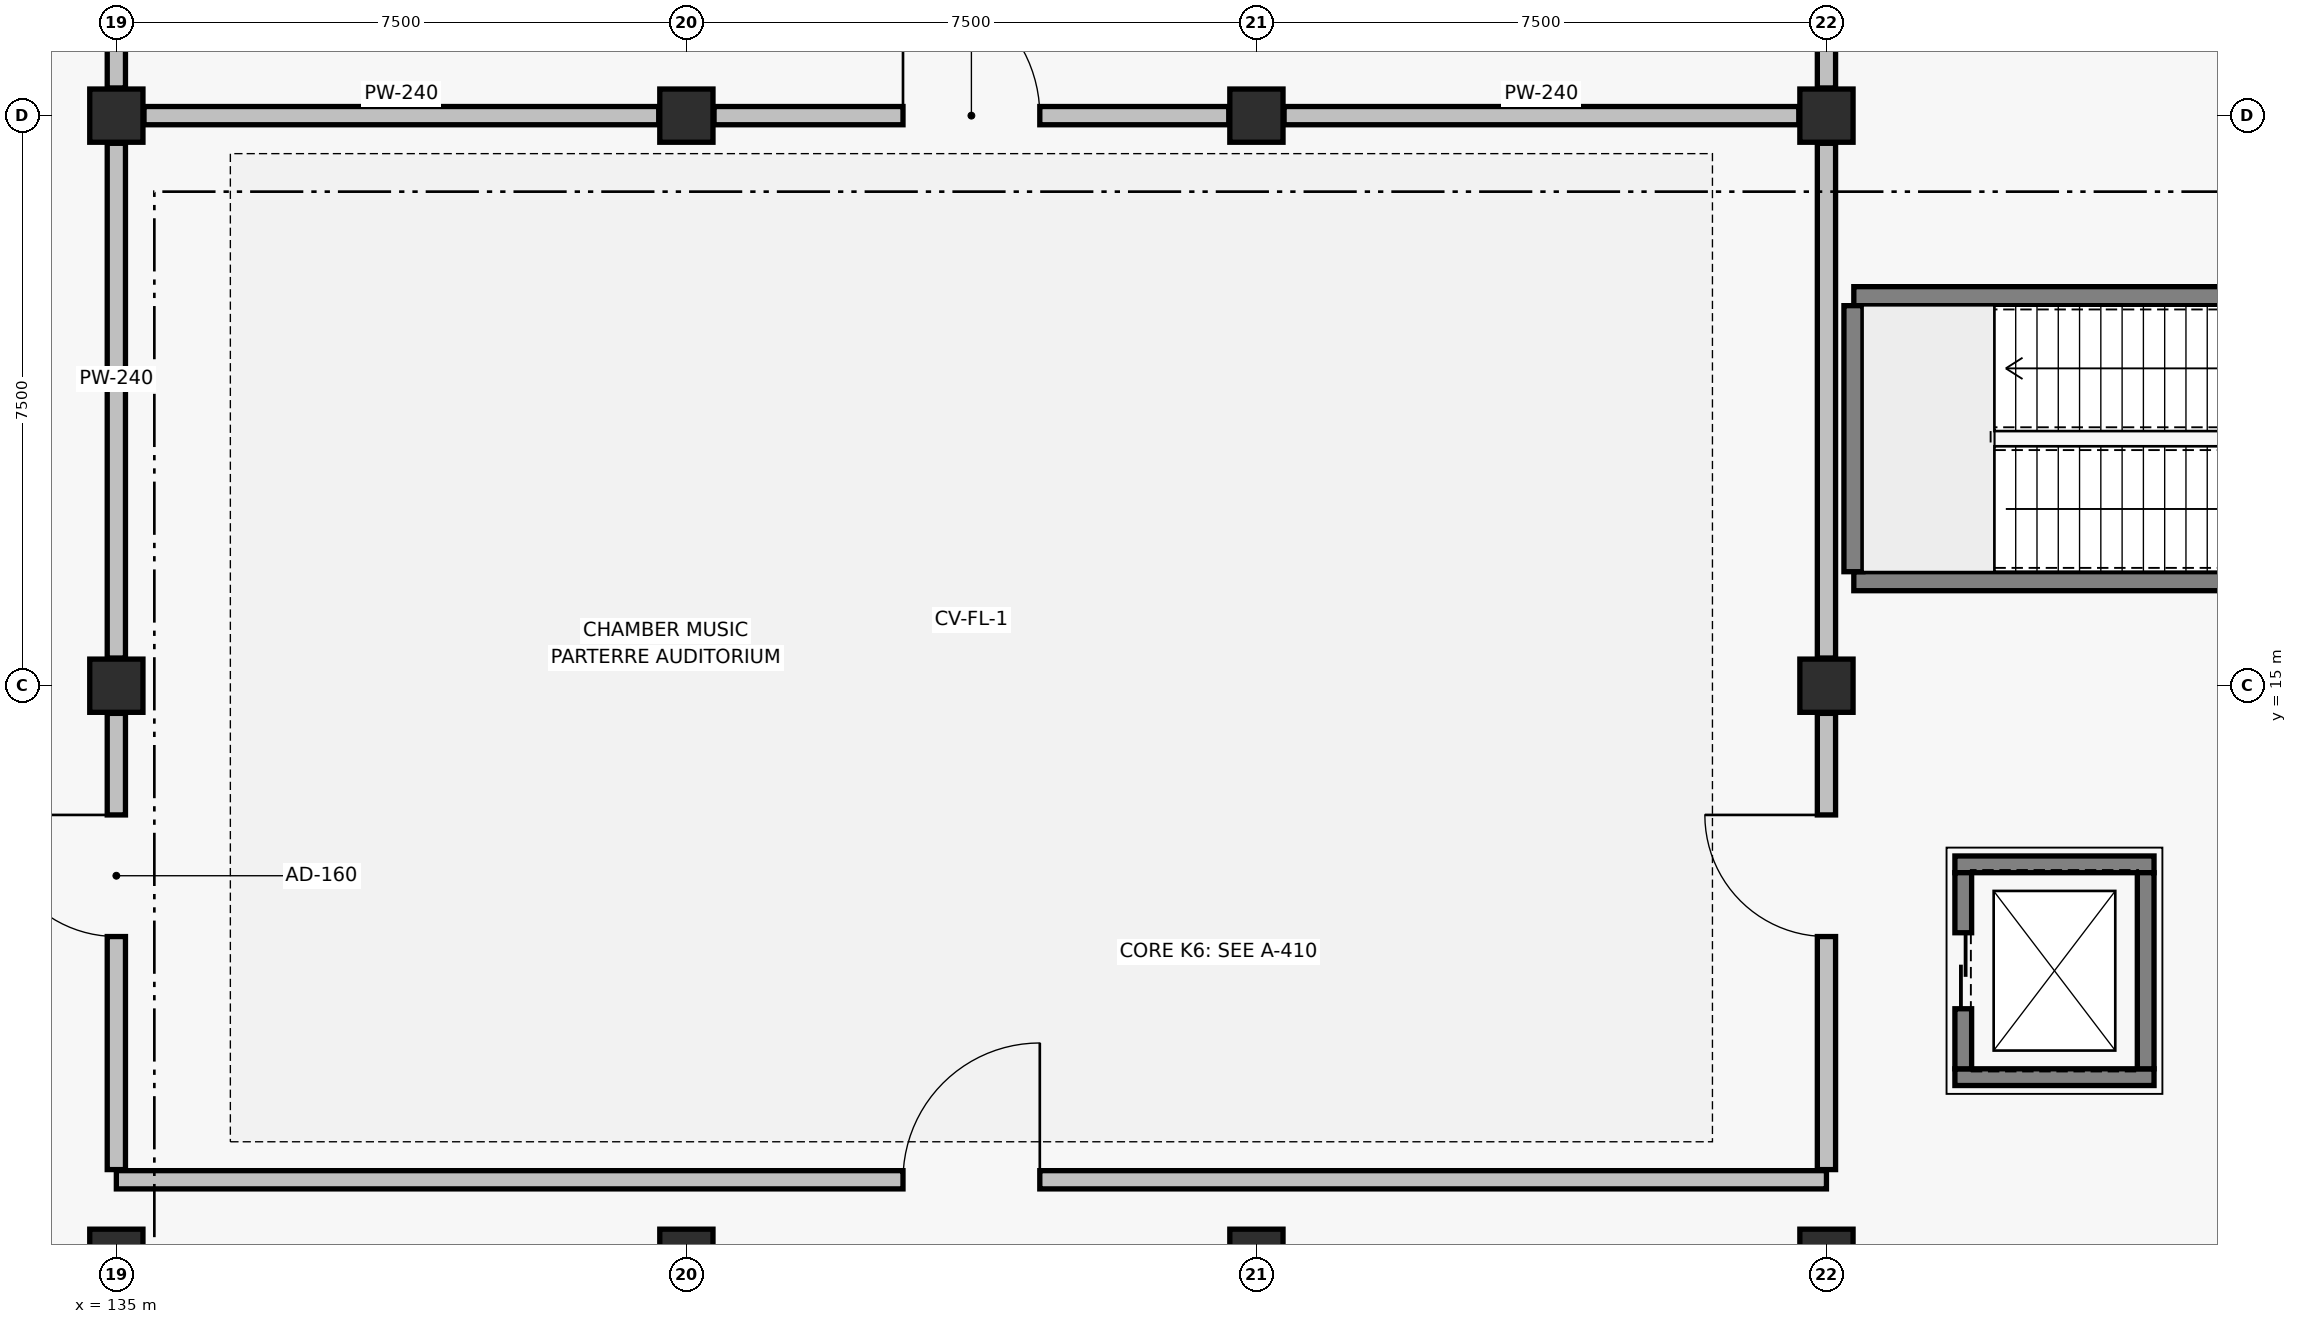
"""IFC4 building model, lengths in metres.
Left out: names, types, materials, properties, quantities, classifications, styles, units other than length and angle.
Written with IfcOpenShell. Run it as: python <this file> out.ifc"""

import sys

from ifc_helpers import new_model, si_unit, direction, frame, frame_2d, origin, origin_2d, place, context, subcontext, project, spatial, rectangle, extrude, element, fill, save


model = new_model("IFC4")
c1 = context("Model", 3, precision=1e-05, world=origin(), true_north=direction((0.0, 1.0)))
c2 = subcontext(c1, "Body", "Model", "MODEL_VIEW")
j1 = project(units=[si_unit("LENGTHUNIT", "METRE"), si_unit("PLANEANGLEUNIT", "RADIAN")], contexts=[c1])
p1 = place(None, origin())
s1 = spatial("IfcSite", under=j1, at=p1, CompositionType="ELEMENT")
p2 = place(p1, origin())
s2 = spatial("IfcBuilding", under=s1, at=p2, CompositionType="ELEMENT")
p3 = place(p2, origin())
s3 = spatial("IfcBuildingStorey", under=s2, at=p3, CompositionType="ELEMENT", Elevation=0.0)
for number, where, z_axis, x_axis in (
    (1, (135.0, 7.5, 0.0), (0.0, 0.0, 1.0), (1.0, 0.0, 0.0)),
    (2, (135.0, 15.0, 0.0), (0.0, 0.0, 1.0), (1.0, 0.0, 0.0)),
    (3, (135.0, 22.5, 0.0), (0.0, 0.0, 1.0), (1.0, 0.0, 0.0)),
    (4, (142.5, 7.5, 0.0), (0.0, 0.0, 1.0), (1.0, 0.0, 0.0)),
    (5, (142.5, 22.5, 0.0), (0.0, 0.0, 1.0), (1.0, 0.0, 0.0)),
    (6, (150.0, 7.5, 0.0), (0.0, 0.0, 1.0), (1.0, 0.0, 0.0)),
    (7, (150.0, 22.5, 0.0), (0.0, 0.0, 1.0), (1.0, 0.0, 0.0)),
    (8, (157.5, 7.5, 0.0), (0.0, 0.0, 1.0), (1.0, 0.0, 0.0)),
    (9, (157.5, 15.0, 0.0), (0.0, 0.0, 1.0), (1.0, 0.0, 0.0)),
    (10, (157.5, 22.5, 0.0), (0.0, 0.0, 1.0), (1.0, 0.0, 0.0)),
):
    element("IfcColumn", number, at=place(p3, frame(where, z_axis=z_axis, x_axis=x_axis)), inside=s3, PredefinedType="COLUMN", context=c2, shape_type="SweptSolid", body=[
        extrude(rectangle(XDim=0.7, YDim=0.7, at=origin_2d()), origin(), (0.0, 0.0, 1.0), 4.8),
    ])
p4 = place(p3, frame((157.86, 16.375, 0.0), z_axis=(0.0, 0.0, 1.0), x_axis=(1.0, 0.0, 0.0)))
e11 = element("IfcWall", 11, at=p4, inside=s3, PredefinedType="SOLIDWALL", context=c2, shape_type="SweptSolid", body=[
    extrude(rectangle(XDim=7.26, YDim=0.25, at=frame_2d((3.63, 0.0))), origin(), (0.0, 0.0, 1.0), 4.5),
])
p5 = place(p4, frame((5.71, 0.0, 0.0)))
e12 = element("IfcOpeningElement", 12, at=p5, cuts=e11, PredefinedType="OPENING", context=c2, shape_type="SweptSolid", body=[
    extrude(rectangle(XDim=1.1, YDim=2.15, at=frame_2d((0.55, 1.075))), frame((0.0, 0.135, 0.0), z_axis=(0.0, -1.0, 0.0), x_axis=(1.0, 0.0, 0.0)), (0.0, 0.0, 1.0), 0.27),
])
p6 = place(p3, frame((157.86, 20.125, 0.0), z_axis=(0.0, 0.0, 1.0), x_axis=(1.0, 0.0, 0.0)))
e13 = element("IfcWall", 13, at=p6, inside=s3, PredefinedType="SOLIDWALL", context=c2, shape_type="SweptSolid", body=[
    extrude(rectangle(XDim=7.26, YDim=0.25, at=frame_2d((3.63, 0.0))), origin(), (0.0, 0.0, 1.0), 4.5),
])
p7 = place(p3, frame((157.855, 16.5, 0.0), z_axis=(0.0, 0.0, 1.0), x_axis=(0.0, 1.0, 0.0)))
e14 = element("IfcWall", 14, at=p7, inside=s3, PredefinedType="SOLIDWALL", context=c2, shape_type="SweptSolid", body=[
    extrude(rectangle(XDim=3.5, YDim=0.25, at=frame_2d((1.75, 0.0))), origin(), (0.0, 0.0, 1.0), 4.5),
])
for number, where, z_axis, x_axis in (
    (15, (159.19, 9.85, 0.0), (0.0, 0.0, 1.0), (1.0, 0.0, 0.0)),
    (16, (159.19, 12.65, 0.0), (0.0, 0.0, 1.0), (1.0, 0.0, 0.0)),
):
    element("IfcWall", number, at=place(p3, frame(where, z_axis=z_axis, x_axis=x_axis)), inside=s3, PredefinedType="SOLIDWALL", context=c2, shape_type="SweptSolid", body=[
        extrude(rectangle(XDim=2.62, YDim=0.22, at=frame_2d((1.31, 0.0))), origin(), (0.0, 0.0, 1.0), 4.5),
    ])
p8 = place(p3, frame((159.3, 9.96, 0.0), z_axis=(0.0, 0.0, 1.0), x_axis=(0.0, 1.0, 0.0)))
e17 = element("IfcWall", 17, at=p8, inside=s3, PredefinedType="SOLIDWALL", context=c2, shape_type="SweptSolid", body=[
    extrude(rectangle(XDim=2.58, YDim=0.22, at=frame_2d((1.29, 0.0))), origin(), (0.0, 0.0, 1.0), 4.5),
])
p9 = place(p8, frame((0.79, 0.0, 0.0)))
e18 = element("IfcOpeningElement", 18, at=p9, cuts=e17, PredefinedType="OPENING", context=c2, shape_type="SweptSolid", body=[
    extrude(rectangle(XDim=1.0, YDim=2.15, at=frame_2d((0.5, 1.075))), frame((0.0, 0.12, 0.0), z_axis=(0.0, -1.0, 0.0), x_axis=(1.0, 0.0, 0.0)), (0.0, 0.0, 1.0), 0.24),
])
p10 = place(p3, frame((161.7, 9.96, 0.0), z_axis=(0.0, 0.0, 1.0), x_axis=(0.0, 1.0, 0.0)))
e19 = element("IfcWall", 19, at=p10, inside=s3, PredefinedType="SOLIDWALL", context=c2, shape_type="SweptSolid", body=[
    extrude(rectangle(XDim=2.58, YDim=0.22, at=frame_2d((1.29, 0.0))), origin(), (0.0, 0.0, 1.0), 4.5),
])
p11 = place(p3, frame((135.0, 8.5, 0.0), z_axis=(0.0, 0.0, 1.0), x_axis=(1.0, 0.0, 0.0)))
e20 = element("IfcWall", 20, at=p11, inside=s3, PredefinedType="PARTITIONING", context=c2, shape_type="SweptSolid", body=[
    extrude(rectangle(XDim=22.5, YDim=0.24, at=frame_2d((11.25, 0.0))), origin(), (0.0, 0.0, 1.0), 2.97),
])
p12 = place(p11, frame((10.35, 0.0, 0.0)))
e21 = element("IfcOpeningElement", 21, at=p12, cuts=e20, PredefinedType="OPENING", context=c2, shape_type="SweptSolid", body=[
    extrude(rectangle(XDim=1.8, YDim=2.16, at=frame_2d((0.9, 1.08))), frame((0.0, 0.13, 0.0), z_axis=(0.0, -1.0, 0.0), x_axis=(1.0, 0.0, 0.0)), (0.0, 0.0, 1.0), 0.26),
])
p13 = place(p3, frame((135.364, 22.5, 0.0), z_axis=(0.0, 0.0, 1.0), x_axis=(1.0, 0.0, 0.0)))
e22 = element("IfcWall", 22, at=p13, inside=s3, PredefinedType="PARTITIONING", context=c2, shape_type="SweptSolid", body=[
    extrude(rectangle(XDim=6.772, YDim=0.24, at=frame_2d((3.386, 0.0))), origin(), (0.0, 0.0, 1.0), 2.97),
])
p14 = place(p3, frame((142.864, 22.5, 0.0), z_axis=(0.0, 0.0, 1.0), x_axis=(1.0, 0.0, 0.0)))
e23 = element("IfcWall", 23, at=p14, inside=s3, PredefinedType="PARTITIONING", context=c2, shape_type="SweptSolid", body=[
    extrude(rectangle(XDim=6.772, YDim=0.24, at=frame_2d((3.386, 0.0))), origin(), (0.0, 0.0, 1.0), 2.97),
])
p15 = place(p14, frame((2.486, 0.0, 0.0)))
e24 = element("IfcOpeningElement", 24, at=p15, cuts=e23, PredefinedType="OPENING", context=c2, shape_type="SweptSolid", body=[
    extrude(rectangle(XDim=1.8, YDim=2.16, at=frame_2d((0.9, 1.08))), frame((0.0, 0.13, 0.0), z_axis=(0.0, -1.0, 0.0), x_axis=(1.0, 0.0, 0.0)), (0.0, 0.0, 1.0), 0.26),
])
p16 = place(p3, frame((150.364, 22.5, 0.0), z_axis=(0.0, 0.0, 1.0), x_axis=(1.0, 0.0, 0.0)))
e25 = element("IfcWall", 25, at=p16, inside=s3, PredefinedType="PARTITIONING", context=c2, shape_type="SweptSolid", body=[
    extrude(rectangle(XDim=6.772, YDim=0.24, at=frame_2d((3.386, 0.0))), origin(), (0.0, 0.0, 1.0), 2.97),
])
p17 = place(p3, frame((135.0, 8.634, 0.0), z_axis=(0.0, 0.0, 1.0), x_axis=(0.0, 1.0, 0.0)))
e26 = element("IfcWall", 26, at=p17, inside=s3, PredefinedType="PARTITIONING", context=c2, shape_type="SweptSolid", body=[
    extrude(rectangle(XDim=6.002, YDim=0.24, at=frame_2d((3.001, 0.0))), origin(), (0.0, 0.0, 1.0), 3.52),
])
p18 = place(p17, frame((3.066, 0.0, 0.0)))
e27 = element("IfcOpeningElement", 27, at=p18, cuts=e26, PredefinedType="OPENING", context=c2, shape_type="SweptSolid", body=[
    extrude(rectangle(XDim=1.6, YDim=2.16, at=frame_2d((0.8, 1.08))), frame((0.0, 0.13, 0.0), z_axis=(0.0, -1.0, 0.0), x_axis=(1.0, 0.0, 0.0)), (0.0, 0.0, 1.0), 0.26),
])
p19 = place(p3, frame((135.0, 15.364, 0.0), z_axis=(0.0, 0.0, 1.0), x_axis=(0.0, 1.0, 0.0)))
e28 = element("IfcWall", 28, at=p19, inside=s3, PredefinedType="PARTITIONING", context=c2, shape_type="SweptSolid", body=[
    extrude(rectangle(XDim=6.772, YDim=0.24, at=frame_2d((3.386, 0.0))), origin(), (0.0, 0.0, 1.0), 3.42),
])
p20 = place(p3, frame((135.0, 22.864, 0.0), z_axis=(0.0, 0.0, 1.0), x_axis=(0.0, 1.0, 0.0)))
e29 = element("IfcWall", 29, at=p20, inside=s3, PredefinedType="PARTITIONING", context=c2, shape_type="SweptSolid", body=[
    extrude(rectangle(XDim=6.672, YDim=0.24, at=frame_2d((3.336, 0.0))), origin(), (0.0, 0.0, 1.0), 3.42),
])
p21 = place(p20, frame((2.736, 0.0, 0.0)))
e30 = element("IfcOpeningElement", 30, at=p21, cuts=e29, PredefinedType="OPENING", context=c2, shape_type="SweptSolid", body=[
    extrude(rectangle(XDim=1.3, YDim=2.15, at=frame_2d((0.65, 1.075))), frame((0.0, 0.13, 0.0), z_axis=(0.0, -1.0, 0.0), x_axis=(1.0, 0.0, 0.0)), (0.0, 0.0, 1.0), 0.26),
])
p22 = place(p3, frame((157.5, 8.634, 0.0), z_axis=(0.0, 0.0, 1.0), x_axis=(0.0, 1.0, 0.0)))
e31 = element("IfcWall", 31, at=p22, inside=s3, PredefinedType="PARTITIONING", context=c2, shape_type="SweptSolid", body=[
    extrude(rectangle(XDim=6.002, YDim=0.24, at=frame_2d((3.001, 0.0))), origin(), (0.0, 0.0, 1.0), 3.42),
])
p23 = place(p22, frame((3.066, 0.0, 0.0)))
e32 = element("IfcOpeningElement", 32, at=p23, cuts=e31, PredefinedType="OPENING", context=c2, shape_type="SweptSolid", body=[
    extrude(rectangle(XDim=1.6, YDim=2.16, at=frame_2d((0.8, 1.08))), frame((0.0, 0.13, 0.0), z_axis=(0.0, -1.0, 0.0), x_axis=(1.0, 0.0, 0.0)), (0.0, 0.0, 1.0), 0.26),
])
p24 = place(p3, frame((157.5, 15.364, 0.0), z_axis=(0.0, 0.0, 1.0), x_axis=(0.0, 1.0, 0.0)))
e33 = element("IfcWall", 33, at=p24, inside=s3, PredefinedType="PARTITIONING", context=c2, shape_type="SweptSolid", body=[
    extrude(rectangle(XDim=6.772, YDim=0.24, at=frame_2d((3.386, 0.0))), origin(), (0.0, 0.0, 1.0), 3.42),
])
p25 = place(p3, frame((157.5, 22.864, 0.0), z_axis=(0.0, 0.0, 1.0), x_axis=(0.0, 1.0, 0.0)))
e34 = element("IfcWall", 34, at=p25, inside=s3, PredefinedType="PARTITIONING", context=c2, shape_type="SweptSolid", body=[
    extrude(rectangle(XDim=6.672, YDim=0.24, at=frame_2d((3.336, 0.0))), origin(), (0.0, 0.0, 1.0), 3.42),
])
p26 = place(p25, frame((2.736, 0.0, 0.0)))
e35 = element("IfcOpeningElement", 35, at=p26, cuts=e34, PredefinedType="OPENING", context=c2, shape_type="SweptSolid", body=[
    extrude(rectangle(XDim=1.3, YDim=2.15, at=frame_2d((0.65, 1.075))), frame((0.0, 0.13, 0.0), z_axis=(0.0, -1.0, 0.0), x_axis=(1.0, 0.0, 0.0)), (0.0, 0.0, 1.0), 0.26),
])
p27 = place(p9, origin())
e36 = element("IfcDoor", 36, at=p27, inside=s3, OperationType="SLIDING_TO_LEFT", PredefinedType="DOOR", context=c2, shape_type="SweptSolid", body=[
    extrude(rectangle(XDim=1.0, YDim=2.15, at=frame_2d((0.5, 1.075))), frame((0.0, 0.025, 0.0), z_axis=(0.0, -1.0, 0.0), x_axis=(1.0, 0.0, 0.0)), (0.0, 0.0, 1.0), 0.05),
])
fill(e18, e36)
p28 = place(p12, origin())
e37 = element("IfcDoor", 37, at=p28, inside=s3, OperationType="SINGLE_SWING_RIGHT", PredefinedType="DOOR", context=c2, shape_type="SweptSolid", body=[
    extrude(rectangle(XDim=1.8, YDim=2.16, at=frame_2d((0.9, 1.08))), frame((0.0, 0.025, 0.0), z_axis=(0.0, -1.0, 0.0), x_axis=(1.0, 0.0, 0.0)), (0.0, 0.0, 1.0), 0.05),
])
fill(e21, e37)
p29 = place(p15, origin())
e38 = element("IfcDoor", 38, at=p29, inside=s3, OperationType="SINGLE_SWING_LEFT", PredefinedType="DOOR", context=c2, shape_type="SweptSolid", body=[
    extrude(rectangle(XDim=1.8, YDim=2.16, at=frame_2d((0.9, 1.08))), frame((0.0, 0.025, 0.0), z_axis=(0.0, -1.0, 0.0), x_axis=(1.0, 0.0, 0.0)), (0.0, 0.0, 1.0), 0.05),
])
fill(e24, e38)
p30 = place(p18, origin())
e39 = element("IfcDoor", 39, at=p30, inside=s3, OperationType="SINGLE_SWING_RIGHT", PredefinedType="DOOR", context=c2, shape_type="SweptSolid", body=[
    extrude(rectangle(XDim=1.6, YDim=2.16, at=frame_2d((0.8, 1.08))), frame((0.0, 0.025, 0.0), z_axis=(0.0, -1.0, 0.0), x_axis=(1.0, 0.0, 0.0)), (0.0, 0.0, 1.0), 0.05),
])
fill(e27, e39)
p31 = place(p23, origin())
e40 = element("IfcDoor", 40, at=p31, inside=s3, OperationType="SINGLE_SWING_RIGHT", PredefinedType="DOOR", context=c2, shape_type="SweptSolid", body=[
    extrude(rectangle(XDim=1.6, YDim=2.16, at=frame_2d((0.8, 1.08))), frame((0.0, 0.025, 0.0), z_axis=(0.0, -1.0, 0.0), x_axis=(1.0, 0.0, 0.0)), (0.0, 0.0, 1.0), 0.05),
])
fill(e32, e40)
save(model, sys.argv[1])
